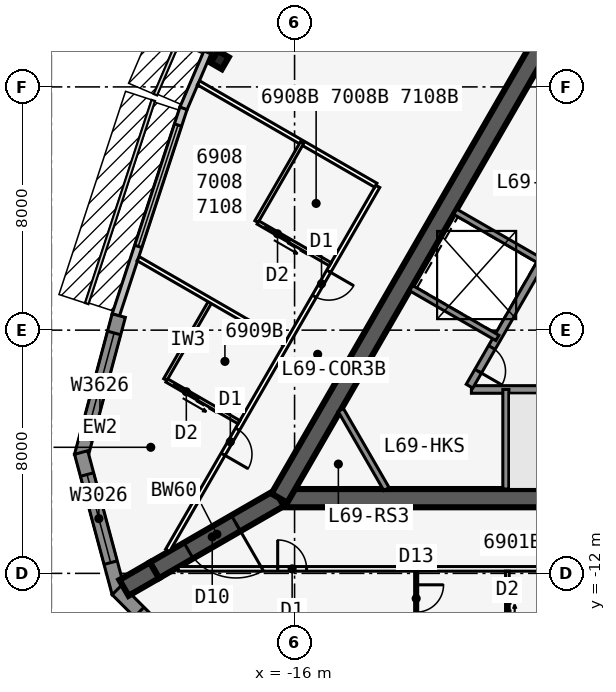
"""IFC4 building model, lengths in metres.
Left out: names, types, materials, properties, quantities, classifications, styles, units other than length and angle.
Written with IfcOpenShell. Run it as: python <this file> out.ifc"""

import sys

from ifc_helpers import new_model, si_unit, direction, frame, frame_2d, origin, origin_2d, place, context, subcontext, project, spatial, polyline, rectangle, i_section, outline, extrude, element, fill, save


model = new_model("IFC4")
c1 = context("Model", 3, precision=1e-05, world=origin(), true_north=direction((0.0, 1.0)))
c2 = subcontext(c1, "Body", "Model", "MODEL_VIEW")
j1 = project(units=[si_unit("LENGTHUNIT", "METRE"), si_unit("PLANEANGLEUNIT", "RADIAN")], contexts=[c1])
p1 = place(None, origin())
s1 = spatial("IfcSite", under=j1, at=p1, CompositionType="ELEMENT")
p2 = place(p1, origin())
s2 = spatial("IfcBuilding", under=s1, at=p2, CompositionType="ELEMENT")
p3 = place(p2, frame((0.0, 0.0, 260.9)))
s3 = spatial("IfcBuildingStorey", under=s2, at=p3, CompositionType="ELEMENT", Elevation=260.9)
p4 = place(p3, frame((-16.5, -9.526, 0.0), z_axis=(0.0, 0.0, 1.0), x_axis=(1.0, 0.0, 0.0)))
e1 = element("IfcWall", 1, at=p4, inside=s3, PredefinedType="SHEAR", context=c2, shape_type="SweptSolid", body=[
    extrude(rectangle(XDim=33.0, YDim=0.6, at=frame_2d((16.5, 0.0))), origin(), (0.0, 0.0, 1.0), 3.6),
])
p5 = place(p4, frame((14.05, 0.0, 0.0)))
e2 = element("IfcOpeningElement", 2, at=p5, cuts=e1, PredefinedType="OPENING", context=c2, shape_type="SweptSolid", body=[
    extrude(rectangle(XDim=1.8, YDim=2.13, at=frame_2d((0.9, 1.065))), frame((0.0, 0.31, 0.0), z_axis=(0.0, -1.0, 0.0), x_axis=(1.0, 0.0, 0.0)), (0.0, 0.0, 1.0), 0.62),
])
p6 = place(p3, frame((-10.183, -5.951, 0.0), z_axis=(0.0, 0.0, 1.0), x_axis=(1.0, 0.0, 0.0)))
e3 = element("IfcWall", 3, at=p6, inside=s3, PredefinedType="SOLIDWALL", context=c2, shape_type="SweptSolid", body=[
    extrude(rectangle(XDim=7.633, YDim=0.25, at=frame_2d((3.816, 0.0))), origin(), (0.0, 0.0, 1.0), 3.435),
])
p7 = place(p3, frame((-9.05, -5.951, 0.0), z_axis=(0.0, 0.0, 1.0), x_axis=(0.0, -1.0, 0.0)))
e4 = element("IfcWall", 4, at=p7, inside=s3, PredefinedType="SOLIDWALL", context=c2, shape_type="SweptSolid", body=[
    extrude(rectangle(XDim=3.275, YDim=0.2, at=frame_2d((1.637, 0.0))), origin(), (0.0, 0.0, 1.0), 3.435),
])
p8 = place(p3, frame((0.0, 19.052, 0.0), z_axis=(0.0, 0.0, 1.0), x_axis=(-0.499999749417, -0.866025548458, 0.0)))
e5 = element("IfcWall", 5, at=p8, inside=s3, PredefinedType="SHEAR", context=c2, shape_type="SweptSolid", body=[
    extrude(rectangle(XDim=33.0, YDim=0.6, at=frame_2d((16.5, 0.0))), origin(), (0.0, 0.0, 1.0), 3.6),
])
p9 = place(p8, frame((14.15, 0.0, 0.0)))
e6 = element("IfcOpeningElement", 6, at=p9, cuts=e5, PredefinedType="OPENING", context=c2, shape_type="SweptSolid", body=[
    extrude(rectangle(XDim=1.8, YDim=2.13, at=frame_2d((0.9, 1.065))), frame((0.0, 0.31, 0.0), z_axis=(0.0, -1.0, 0.0), x_axis=(1.0, 0.0, 0.0)), (0.0, 0.0, 1.0), 0.62),
])
p10 = place(p8, frame((12.6, 0.0, 0.0)))
e7 = element("IfcOpeningElement", 7, at=p10, cuts=e5, PredefinedType="OPENING", context=c2, shape_type="SweptSolid", body=[
    extrude(rectangle(XDim=1.0, YDim=2.13, at=frame_2d((0.5, 1.065))), frame((0.0, 0.31, 0.0), z_axis=(0.0, -1.0, 0.0), x_axis=(1.0, 0.0, 0.0)), (0.0, 0.0, 1.0), 0.62),
])
p11 = place(p3, frame((-4.929, 3.365, 0.0), z_axis=(0.0, 0.0, 1.0), x_axis=(-0.499991433582, -0.866030349552, 0.0)))
e8 = element("IfcWall", 8, at=p11, inside=s3, PredefinedType="SOLIDWALL", context=c2, shape_type="SweptSolid", body=[
    extrude(rectangle(XDim=10.633, YDim=0.25, at=frame_2d((5.316, 0.0))), origin(), (0.0, 0.0, 1.0), 3.435),
])
p12 = place(p11, frame((9.164, 0.0, 0.0)))
e9 = element("IfcOpeningElement", 9, at=p12, cuts=e8, PredefinedType="OPENING", context=c2, shape_type="SweptSolid", body=[
    extrude(rectangle(XDim=0.9, YDim=2.13, at=frame_2d((0.45, 1.065))), frame((0.0, 0.135, 0.0), z_axis=(0.0, -1.0, 0.0), x_axis=(1.0, 0.0, 0.0)), (0.0, 0.0, 1.0), 0.27),
])
p13 = place(p11, frame((1.1, 0.0, 0.0)))
e10 = element("IfcOpeningElement", 10, at=p13, cuts=e8, PredefinedType="OPENING", context=c2, shape_type="SweptSolid", body=[
    extrude(rectangle(XDim=0.9, YDim=2.13, at=frame_2d((0.45, 1.065))), frame((0.0, 0.135, 0.0), z_axis=(0.0, -1.0, 0.0), x_axis=(1.0, 0.0, 0.0)), (0.0, 0.0, 1.0), 0.27),
])
p14 = place(p11, frame((4.0, 0.0, 0.0)))
e11 = element("IfcOpeningElement", 11, at=p14, cuts=e8, PredefinedType="OPENING", context=c2, shape_type="SweptSolid", body=[
    extrude(rectangle(XDim=0.9, YDim=2.13, at=frame_2d((0.45, 1.065))), frame((0.0, 0.135, 0.0), z_axis=(0.0, -1.0, 0.0), x_axis=(1.0, 0.0, 0.0)), (0.0, 0.0, 1.0), 0.27),
])
for number, where, z_axis, x_axis in (
    (12, (-7.879, -1.744, 0.0), (0.0, 0.0, 1.0), (-0.866, 0.5, 0.0)),
    (13, (-9.329, -4.256, 0.0), (0.0, 0.0, 1.0), (-0.866, 0.5, 0.0)),
):
    element("IfcWall", number, at=place(p3, frame(where, z_axis=z_axis, x_axis=x_axis)), inside=s3, PredefinedType="SOLIDWALL", context=c2, shape_type="SweptSolid", body=[
        extrude(rectangle(XDim=3.275, YDim=0.2, at=frame_2d((1.637, 0.0))), origin(), (0.0, 0.0, 1.0), 3.435),
    ])
p15 = place(p3, frame((-16.5, -9.526, 0.0), z_axis=(0.0, 0.0, 1.0), x_axis=(-0.866031398331, -0.499989616998, 0.0)))
e14 = element("IfcWall", 14, at=p15, inside=s3, PredefinedType="SHEAR", context=c2, shape_type="SweptSolid", body=[
    extrude(rectangle(XDim=4.746, YDim=0.6, at=frame_2d((2.373, 0.0))), origin(), (0.0, 0.0, 1.0), 3.6),
])
p16 = place(p15, frame((1.65, 0.0, 0.0)))
e15 = element("IfcOpeningElement", 15, at=p16, cuts=e14, PredefinedType="OPENING", context=c2, shape_type="SweptSolid", body=[
    extrude(rectangle(XDim=1.8, YDim=2.13, at=frame_2d((0.9, 1.065))), frame((0.0, 0.31, 0.0), z_axis=(0.0, -1.0, 0.0), x_axis=(1.0, 0.0, 0.0)), (0.0, 0.0, 1.0), 0.62),
])
p17 = place(p3, frame((-20.61, -11.899, 0.0), z_axis=(0.0, 0.0, 1.0), x_axis=(-0.866009537788, -0.500027479704, 0.0)))
e16 = element("IfcWall", 16, at=p17, inside=s3, PredefinedType="SHEAR", context=c2, shape_type="SweptSolid", body=[
    extrude(rectangle(XDim=1.155, YDim=0.6, at=frame_2d((0.577, 0.0))), origin(), (0.0, 0.0, 1.0), 3.6),
])
p18 = place(p3, frame((-18.461, 4.885, 0.0), z_axis=(0.0, 0.0, 1.0), x_axis=(-0.866025403784, 0.5, 0.0)))
e17 = element("IfcColumn", 17, at=p18, inside=s3, PredefinedType="COLUMN", context=c2, shape_type="SweptSolid", body=[
    extrude(i_section(OverallWidth=0.419, OverallDepth=0.455, WebThickness=0.042, FlangeThickness=0.068, at=origin_2d()), origin(), (0.0, 0.0, 1.0), 3.6),
])
p19 = place(p3, frame((-13.873, 13.783, 0.0), z_axis=(0.0, 0.0, 1.0), x_axis=(-0.499993662806, -0.866029062534, 0.0)))
e18 = element("IfcWall", 18, at=p19, inside=s3, PredefinedType="STANDARD", context=c2, shape_type="SweptSolid", body=[
    extrude(rectangle(XDim=10.0, YDim=0.25, at=frame_2d((5.0, 0.0))), origin(), (0.0, 0.0, 1.0), 3.435),
])
p20 = place(p19, frame((2.9, 0.0, 0.45)))
e19 = element("IfcOpeningElement", 19, at=p20, cuts=e18, PredefinedType="OPENING", context=c2, shape_type="SweptSolid", body=[
    extrude(rectangle(XDim=4.2, YDim=2.6, at=frame_2d((2.1, 1.3))), frame((0.0, 0.135, 0.0), z_axis=(0.0, -1.0, 0.0), x_axis=(1.0, 0.0, 0.0)), (0.0, 0.0, 1.0), 0.27),
])
p21 = place(p3, frame((-18.866, 5.136, 0.0), z_axis=(0.0, 0.0, 1.0), x_axis=(-0.393290226175, -0.91941437774, 0.0)))
e20 = element("IfcWall", 20, at=p21, inside=s3, PredefinedType="STANDARD", context=c2, shape_type="SweptSolid", body=[
    extrude(rectangle(XDim=2.014, YDim=0.25, at=frame_2d((1.007, 0.0))), origin(), (0.0, 0.0, 1.0), 3.435),
])
p22 = place(p3, frame((-19.654, 3.294, 0.0), z_axis=(0.0, 0.0, 1.0), x_axis=(-0.311328857048, -0.95030223759, 0.0)))
e21 = element("IfcWall", 21, at=p22, inside=s3, PredefinedType="STANDARD", context=c2, shape_type="SweptSolid", body=[
    extrude(rectangle(XDim=7.153, YDim=0.25, at=frame_2d((3.576, 0.0))), origin(), (0.0, 0.0, 1.0), 3.435),
])
p23 = place(p22, frame((0.577, 0.0, 0.45)))
e22 = element("IfcOpeningElement", 22, at=p23, cuts=e21, PredefinedType="OPENING", context=c2, shape_type="SweptSolid", body=[
    extrude(rectangle(XDim=4.2, YDim=2.6, at=frame_2d((2.1, 1.3))), frame((0.0, 0.135, 0.0), z_axis=(0.0, -1.0, 0.0), x_axis=(1.0, 0.0, 0.0)), (0.0, 0.0, 1.0), 0.27),
])
p24 = place(p3, frame((-21.783, -3.522, 0.0), z_axis=(0.0, 0.0, 1.0), x_axis=(-0.25880328844, -0.965930048136, 0.0)))
e23 = element("IfcWall", 23, at=p24, inside=s3, PredefinedType="SOLIDWALL", context=c2, shape_type="SweptSolid", body=[
    extrude(rectangle(XDim=4.782, YDim=0.45, at=frame_2d((2.391, 0.0))), origin(), (0.0, 0.0, 1.0), 3.435),
])
p25 = place(p24, frame((0.591, 0.0, 0.45)))
e24 = element("IfcOpeningElement", 24, at=p25, cuts=e23, PredefinedType="OPENING", context=c2, shape_type="SweptSolid", body=[
    extrude(rectangle(XDim=3.6, YDim=2.6, at=frame_2d((1.8, 1.3))), frame((0.0, 0.235, 0.0), z_axis=(0.0, -1.0, 0.0), x_axis=(1.0, 0.0, 0.0)), (0.0, 0.0, 1.0), 0.47),
])
p26 = place(p3, frame((-23.02, -8.025, 0.0), z_axis=(0.0, 0.0, 1.0), x_axis=(0.25880328844, -0.965930048136, 0.0)))
e25 = element("IfcWall", 25, at=p26, inside=s3, PredefinedType="SOLIDWALL", context=c2, shape_type="SweptSolid", body=[
    extrude(outline(polyline([(4.782, 0.225), (4.722, 0.225), (4.375, 0.132), (4.351, 0.225), (0.0, 0.225), (0.0, -0.225), (4.782, -0.225), (4.782, 0.225)])), origin(), (0.0, 0.0, 1.0), 3.435),
])
p27 = place(p26, frame((0.75, 0.0, 0.45)))
e26 = element("IfcOpeningElement", 26, at=p27, cuts=e25, PredefinedType="OPENING", context=c2, shape_type="SweptSolid", body=[
    extrude(rectangle(XDim=3.0, YDim=2.6, at=frame_2d((1.5, 1.3))), frame((0.0, 0.235, 0.0), z_axis=(0.0, -1.0, 0.0), x_axis=(1.0, 0.0, 0.0)), (0.0, 0.0, 1.0), 0.47),
])
p28 = place(p3, frame((-21.841, -12.542, 0.0), z_axis=(0.0, 0.0, 1.0), x_axis=(0.707081252484, -0.707132308968, 0.0)))
e27 = element("IfcWall", 27, at=p28, inside=s3, PredefinedType="SOLIDWALL", context=c2, shape_type="SweptSolid", body=[
    extrude(outline(polyline([(4.782, 0.225), (0.431, 0.225), (0.406, 0.132), (0.059, 0.225), (0.0, 0.225), (0.0, -0.225), (4.782, -0.225), (4.782, 0.225)])), origin(), (0.0, 0.0, 1.0), 3.435),
])
p29 = place(p28, frame((1.031, 0.0, 0.45)))
e28 = element("IfcOpeningElement", 28, at=p29, cuts=e27, PredefinedType="OPENING", context=c2, shape_type="SweptSolid", body=[
    extrude(rectangle(XDim=3.0, YDim=2.6, at=frame_2d((1.5, 1.3))), frame((0.0, 0.235, 0.0), z_axis=(0.0, -1.0, 0.0), x_axis=(1.0, 0.0, 0.0)), (0.0, 0.0, 1.0), 0.47),
])
p30 = place(p3, frame((-19.827, -11.851, 0.0), z_axis=(0.0, 0.0, 1.0), x_axis=(1.0, 0.0, 0.0)))
e29 = element("IfcWall", 29, at=p30, inside=s3, PredefinedType="PARTITIONING", context=c2, shape_type="SweptSolid", body=[
    extrude(rectangle(XDim=39.654, YDim=0.15, at=frame_2d((19.827, 0.0))), origin(), (0.0, 0.0, 1.0), 3.435),
])
p31 = place(p30, frame((3.272, 0.0, 0.0)))
e30 = element("IfcOpeningElement", 30, at=p31, cuts=e29, PredefinedType="OPENING", context=c2, shape_type="SweptSolid", body=[
    extrude(rectangle(XDim=0.95, YDim=2.13, at=frame_2d((0.475, 1.065))), frame((0.0, 0.085, 0.0), z_axis=(0.0, -1.0, 0.0), x_axis=(1.0, 0.0, 0.0)), (0.0, 0.0, 1.0), 0.17),
])
p32 = place(p30, frame((17.052, 0.0, 0.0)))
e31 = element("IfcOpeningElement", 31, at=p32, cuts=e29, PredefinedType="OPENING", context=c2, shape_type="SweptSolid", body=[
    extrude(rectangle(XDim=0.95, YDim=2.13, at=frame_2d((0.475, 1.065))), frame((0.0, 0.085, 0.0), z_axis=(0.0, -1.0, 0.0), x_axis=(1.0, 0.0, 0.0)), (0.0, 0.0, 1.0), 0.17),
])
p33 = place(p30, frame((23.052, 0.0, 0.0)))
e32 = element("IfcOpeningElement", 32, at=p33, cuts=e29, PredefinedType="OPENING", context=c2, shape_type="SweptSolid", body=[
    extrude(rectangle(XDim=0.95, YDim=2.13, at=frame_2d((0.475, 1.065))), frame((0.0, 0.085, 0.0), z_axis=(0.0, -1.0, 0.0), x_axis=(1.0, 0.0, 0.0)), (0.0, 0.0, 1.0), 0.17),
])
p34 = place(p30, frame((35.432, 0.0, 0.0)))
e33 = element("IfcOpeningElement", 33, at=p34, cuts=e29, PredefinedType="OPENING", context=c2, shape_type="SweptSolid", body=[
    extrude(rectangle(XDim=0.95, YDim=2.13, at=frame_2d((0.475, 1.065))), frame((0.0, 0.085, 0.0), z_axis=(0.0, -1.0, 0.0), x_axis=(1.0, 0.0, 0.0)), (0.0, 0.0, 1.0), 0.17),
])
p35 = place(p3, frame((-12.0, -11.926, 0.0), z_axis=(0.0, 0.0, 1.0), x_axis=(0.0, -1.0, 0.0)))
e34 = element("IfcWall", 34, at=p35, inside=s3, PredefinedType="PARTITIONING", context=c2, shape_type="SweptSolid", body=[
    extrude(rectangle(XDim=5.559, YDim=0.1, at=frame_2d((2.779, 0.0))), origin(), (0.0, 0.0, 1.0), 2.823),
])
p36 = place(p35, frame((0.45, 0.0, 0.0)))
e35 = element("IfcOpeningElement", 35, at=p36, cuts=e34, PredefinedType="OPENING", context=c2, shape_type="SweptSolid", body=[
    extrude(rectangle(XDim=0.9, YDim=2.13, at=frame_2d((0.45, 1.065))), frame((0.0, 0.06, 0.0), z_axis=(0.0, -1.0, 0.0), x_axis=(1.0, 0.0, 0.0)), (0.0, 0.0, 1.0), 0.12),
])
p37 = place(p3, frame((-9.0, -11.926, 0.0), z_axis=(0.0, 0.0, 1.0), x_axis=(0.0, -1.0, 0.0)))
e36 = element("IfcWall", 36, at=p37, inside=s3, PredefinedType="PLUMBINGWALL", context=c2, shape_type="SweptSolid", body=[
    extrude(rectangle(XDim=2.74, YDim=0.12, at=frame_2d((1.37, 0.0))), origin(), (0.0, 0.0, 1.0), 3.435),
])
p38 = place(p37, frame((1.55, 0.0, 0.0)))
e37 = element("IfcOpeningElement", 37, at=p38, cuts=e36, PredefinedType="OPENING", context=c2, shape_type="SweptSolid", body=[
    extrude(rectangle(XDim=0.9, YDim=2.13, at=frame_2d((0.45, 1.065))), frame((0.0, 0.07, 0.0), z_axis=(0.0, -1.0, 0.0), x_axis=(1.0, 0.0, 0.0)), (0.0, 0.0, 1.0), 0.14),
])
p39 = place(p3, frame((-13.263, 0.729, 0.0), z_axis=(0.0, 0.0, 1.0), x_axis=(-0.500001642027, -0.866024455758, 0.0)))
e38 = element("IfcWall", 38, at=p39, inside=s3, PredefinedType="PARTITIONING", context=c2, shape_type="SweptSolid", body=[
    extrude(rectangle(XDim=13.827, YDim=0.15, at=frame_2d((6.914, 0.0))), origin(), (0.0, 0.0, 1.0), 3.435),
])
p40 = place(p39, frame((3.225, 0.0, 0.0)))
e39 = element("IfcOpeningElement", 39, at=p40, cuts=e38, PredefinedType="OPENING", context=c2, shape_type="SweptSolid", body=[
    extrude(rectangle(XDim=0.95, YDim=2.13, at=frame_2d((0.475, 1.065))), frame((0.0, 0.085, 0.0), z_axis=(0.0, -1.0, 0.0), x_axis=(1.0, 0.0, 0.0)), (0.0, 0.0, 1.0), 0.17),
])
p41 = place(p39, frame((9.225, 0.0, 0.0)))
e40 = element("IfcOpeningElement", 40, at=p41, cuts=e38, PredefinedType="OPENING", context=c2, shape_type="SweptSolid", body=[
    extrude(rectangle(XDim=0.95, YDim=2.13, at=frame_2d((0.475, 1.065))), frame((0.0, 0.085, 0.0), z_axis=(0.0, -1.0, 0.0), x_axis=(1.0, 0.0, 0.0)), (0.0, 0.0, 1.0), 0.17),
])
p42 = place(p3, frame((-13.329, 0.767, 0.0), z_axis=(0.0, 0.0, 1.0), x_axis=(-0.866020720842, 0.500008111007, 0.0)))
e41 = element("IfcWall", 41, at=p42, inside=s3, PredefinedType="PARTITIONING", context=c2, shape_type="SweptSolid", body=[
    extrude(rectangle(XDim=6.732, YDim=0.15, at=frame_2d((3.366, 0.0))), origin(), (0.0, 0.0, 1.0), 3.435),
])
p43 = place(p3, frame((-16.329, -4.429, 0.0), z_axis=(0.0, 0.0, 1.0), x_axis=(-0.866029066823, 0.499993655377, 0.0)))
e42 = element("IfcWall", 42, at=p43, inside=s3, PredefinedType="PARTITIONING", context=c2, shape_type="SweptSolid", body=[
    extrude(rectangle(XDim=5.559, YDim=0.15, at=frame_2d((2.779, 0.0))), origin(), (0.0, 0.0, 1.0), 2.823),
])
p44 = place(p3, frame((-15.753, 2.167, 0.0), z_axis=(0.0, 0.0, 1.0), x_axis=(-0.499990139034, -0.866031096941, 0.0)))
e43 = element("IfcWall", 43, at=p44, inside=s3, PredefinedType="PLUMBINGWALL", context=c2, shape_type="SweptSolid", body=[
    extrude(rectangle(XDim=3.0, YDim=0.12, at=frame_2d((1.5, 0.0))), origin(), (0.0, 0.0, 1.0), 3.435),
])
p45 = place(p3, frame((-14.829, -1.831, 0.0), z_axis=(0.0, 0.0, 1.0), x_axis=(-0.866035715982, 0.499982138324, 0.0)))
e44 = element("IfcWall", 44, at=p45, inside=s3, PredefinedType="PLUMBINGWALL", context=c2, shape_type="SweptSolid", body=[
    extrude(rectangle(XDim=2.74, YDim=0.12, at=frame_2d((1.37, 0.0))), origin(), (0.0, 0.0, 1.0), 3.435),
])
p46 = place(p45, frame((1.55, 0.0, 0.0)))
e45 = element("IfcOpeningElement", 45, at=p46, cuts=e44, PredefinedType="OPENING", context=c2, shape_type="SweptSolid", body=[
    extrude(rectangle(XDim=0.9, YDim=2.13, at=frame_2d((0.45, 1.065))), frame((0.0, 0.07, 0.0), z_axis=(0.0, -1.0, 0.0), x_axis=(1.0, 0.0, 0.0)), (0.0, 0.0, 1.0), 0.14),
])
p47 = place(p3, frame((-18.753, -3.029, 0.0), z_axis=(0.0, 0.0, 1.0), x_axis=(-0.50002537861, -0.866010750942, 0.0)))
e46 = element("IfcWall", 46, at=p47, inside=s3, PredefinedType="PLUMBINGWALL", context=c2, shape_type="SweptSolid", body=[
    extrude(rectangle(XDim=3.0, YDim=0.12, at=frame_2d((1.5, 0.0))), origin(), (0.0, 0.0, 1.0), 3.435),
])
p48 = place(p3, frame((-17.829, -7.027, 0.0), z_axis=(0.0, 0.0, 1.0), x_axis=(-0.866035715982, 0.499982138324, 0.0)))
e47 = element("IfcWall", 47, at=p48, inside=s3, PredefinedType="PLUMBINGWALL", context=c2, shape_type="SweptSolid", body=[
    extrude(rectangle(XDim=2.74, YDim=0.12, at=frame_2d((1.37, 0.0))), origin(), (0.0, 0.0, 1.0), 3.435),
])
p49 = place(p48, frame((1.55, 0.0, 0.0)))
e48 = element("IfcOpeningElement", 48, at=p49, cuts=e47, PredefinedType="OPENING", context=c2, shape_type="SweptSolid", body=[
    extrude(rectangle(XDim=0.9, YDim=2.13, at=frame_2d((0.45, 1.065))), frame((0.0, 0.07, 0.0), z_axis=(0.0, -1.0, 0.0), x_axis=(1.0, 0.0, 0.0)), (0.0, 0.0, 1.0), 0.14),
])
p50 = place(p3, frame((-12.978, -9.226, 0.0), z_axis=(0.0, 0.0, 1.0), x_axis=(-0.499952404951, 0.866052881055, 0.0)))
e49 = element("IfcWall", 49, at=p50, inside=s3, PredefinedType="SOLIDWALL", context=c2, shape_type="SweptSolid", body=[
    extrude(rectangle(XDim=3.002, YDim=0.2, at=frame_2d((1.501, 0.0))), origin(), (0.0, 0.0, 1.0), 3.435),
])
p51 = place(p23, origin())
e50 = element("IfcWindow", 50, at=p51, inside=s3, PartitioningType="SINGLE_PANEL", PredefinedType="WINDOW", context=c2, shape_type="SweptSolid", body=[
    extrude(rectangle(XDim=4.2, YDim=2.6, at=frame_2d((2.1, 1.3))), frame((0.0, 0.03, 0.0), z_axis=(0.0, -1.0, 0.0), x_axis=(1.0, 0.0, 0.0)), (0.0, 0.0, 1.0), 0.06),
])
fill(e22, e50)
p52 = place(p25, origin())
e51 = element("IfcWindow", 51, at=p52, inside=s3, PartitioningType="SINGLE_PANEL", PredefinedType="WINDOW", context=c2, shape_type="SweptSolid", body=[
    extrude(rectangle(XDim=3.6, YDim=2.6, at=frame_2d((1.8, 1.3))), frame((0.0, 0.03, 0.0), z_axis=(0.0, -1.0, 0.0), x_axis=(1.0, 0.0, 0.0)), (0.0, 0.0, 1.0), 0.06),
])
fill(e24, e51)
p53 = place(p27, origin())
e52 = element("IfcWindow", 52, at=p53, inside=s3, PartitioningType="SINGLE_PANEL", PredefinedType="WINDOW", context=c2, shape_type="SweptSolid", body=[
    extrude(rectangle(XDim=3.0, YDim=2.6, at=frame_2d((1.5, 1.3))), frame((0.0, 0.03, 0.0), z_axis=(0.0, -1.0, 0.0), x_axis=(1.0, 0.0, 0.0)), (0.0, 0.0, 1.0), 0.06),
])
fill(e26, e52)
p54 = place(p29, origin())
e53 = element("IfcWindow", 53, at=p54, inside=s3, PartitioningType="SINGLE_PANEL", PredefinedType="WINDOW", context=c2, shape_type="SweptSolid", body=[
    extrude(rectangle(XDim=3.0, YDim=2.6, at=frame_2d((1.5, 1.3))), frame((0.0, 0.03, 0.0), z_axis=(0.0, -1.0, 0.0), x_axis=(1.0, 0.0, 0.0)), (0.0, 0.0, 1.0), 0.06),
])
fill(e28, e53)
p55 = place(p36, origin())
e54 = element("IfcDoor", 54, at=p55, inside=s3, OperationType="SINGLE_SWING_LEFT", PredefinedType="DOOR", context=c2, shape_type="SweptSolid", body=[
    extrude(rectangle(XDim=0.9, YDim=2.13, at=frame_2d((0.45, 1.065))), frame((0.0, 0.025, 0.0), z_axis=(0.0, -1.0, 0.0), x_axis=(1.0, 0.0, 0.0)), (0.0, 0.0, 1.0), 0.05),
])
fill(e35, e54)
p56 = place(p31, origin())
e55 = element("IfcDoor", 55, at=p56, inside=s3, OperationType="SINGLE_SWING_LEFT", PredefinedType="DOOR", context=c2, shape_type="SweptSolid", body=[
    extrude(rectangle(XDim=0.95, YDim=2.13, at=frame_2d((0.475, 1.065))), frame((0.0, 0.025, 0.0), z_axis=(0.0, -1.0, 0.0), x_axis=(1.0, 0.0, 0.0)), (0.0, 0.0, 1.0), 0.05),
])
fill(e30, e55)
p57 = place(p46, origin())
e56 = element("IfcDoor", 56, at=p57, inside=s3, OperationType="SLIDING_TO_LEFT", PredefinedType="DOOR", context=c2, shape_type="SweptSolid", body=[
    extrude(rectangle(XDim=0.9, YDim=2.13, at=frame_2d((0.45, 1.065))), frame((0.0, 0.025, 0.0), z_axis=(0.0, -1.0, 0.0), x_axis=(1.0, 0.0, 0.0)), (0.0, 0.0, 1.0), 0.05),
])
fill(e45, e56)
p58 = place(p40, origin())
e57 = element("IfcDoor", 57, at=p58, inside=s3, OperationType="SINGLE_SWING_LEFT", PredefinedType="DOOR", context=c2, shape_type="SweptSolid", body=[
    extrude(rectangle(XDim=0.95, YDim=2.13, at=frame_2d((0.475, 1.065))), frame((0.0, 0.025, 0.0), z_axis=(0.0, -1.0, 0.0), x_axis=(1.0, 0.0, 0.0)), (0.0, 0.0, 1.0), 0.05),
])
fill(e39, e57)
p59 = place(p49, origin())
e58 = element("IfcDoor", 58, at=p59, inside=s3, OperationType="SLIDING_TO_LEFT", PredefinedType="DOOR", context=c2, shape_type="SweptSolid", body=[
    extrude(rectangle(XDim=0.9, YDim=2.13, at=frame_2d((0.45, 1.065))), frame((0.0, 0.025, 0.0), z_axis=(0.0, -1.0, 0.0), x_axis=(1.0, 0.0, 0.0)), (0.0, 0.0, 1.0), 0.05),
])
fill(e48, e58)
p60 = place(p41, origin())
e59 = element("IfcDoor", 59, at=p60, inside=s3, OperationType="SINGLE_SWING_RIGHT", PredefinedType="DOOR", context=c2, shape_type="SweptSolid", body=[
    extrude(rectangle(XDim=0.95, YDim=2.13, at=frame_2d((0.475, 1.065))), frame((0.0, 0.025, 0.0), z_axis=(0.0, -1.0, 0.0), x_axis=(1.0, 0.0, 0.0)), (0.0, 0.0, 1.0), 0.05),
])
fill(e40, e59)
p61 = place(p16, origin())
e60 = element("IfcDoor", 60, at=p61, inside=s3, OperationType="DOUBLE_DOOR_DOUBLE_SWING", PredefinedType="DOOR", context=c2, shape_type="SweptSolid", body=[
    extrude(rectangle(XDim=1.8, YDim=2.13, at=frame_2d((0.9, 1.065))), frame((0.0, 0.025, 0.0), z_axis=(0.0, -1.0, 0.0), x_axis=(1.0, 0.0, 0.0)), (0.0, 0.0, 1.0), 0.05),
])
fill(e15, e60)
p62 = place(p12, origin())
e61 = element("IfcDoor", 61, at=p62, inside=s3, OperationType="SINGLE_SWING_RIGHT", PredefinedType="DOOR", context=c2, shape_type="SweptSolid", body=[
    extrude(rectangle(XDim=0.9, YDim=2.13, at=frame_2d((0.45, 1.065))), frame((0.0, 0.025, 0.0), z_axis=(0.0, -1.0, 0.0), x_axis=(1.0, 0.0, 0.0)), (0.0, 0.0, 1.0), 0.05),
])
fill(e9, e61)
save(model, sys.argv[1])
